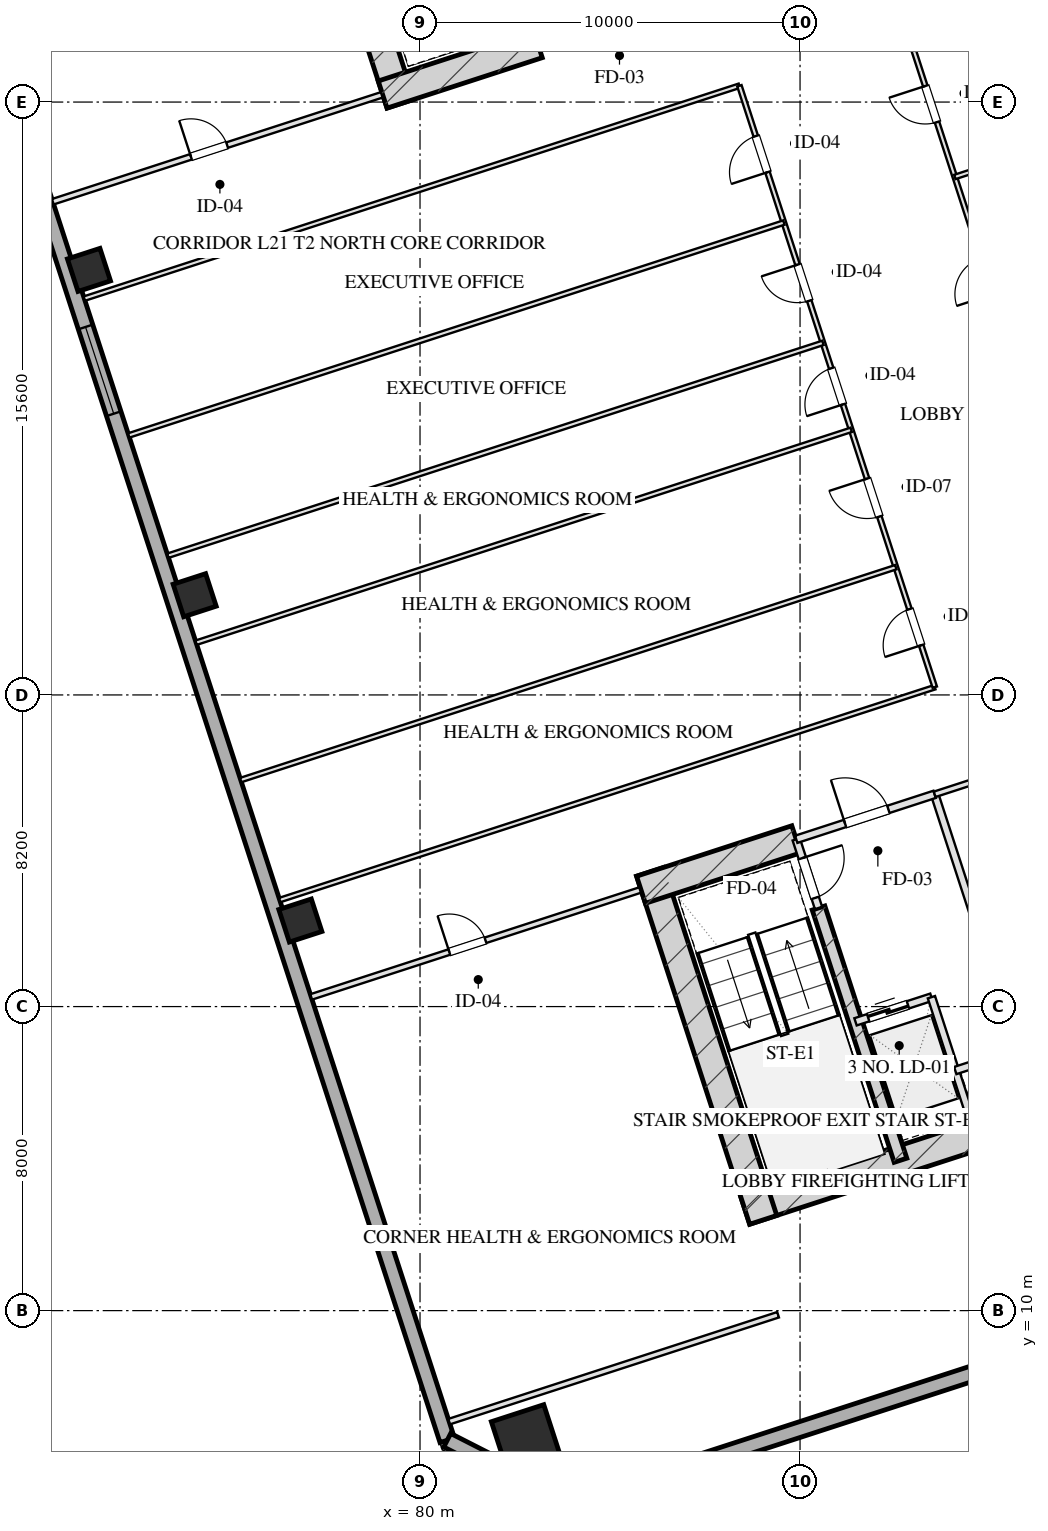
"""IFC4 building model, lengths in metres.
Left out: names, types, materials, properties, quantities, classifications, styles, units other than length and angle.
Written with IfcOpenShell. Run it as: python <this file> out.ifc"""

import sys

from ifc_helpers import new_model, si_unit, direction, frame, frame_2d, origin, origin_2d, place, context, subcontext, project, spatial, rectangle, hollow_rectangle, extrude, element, fill, save


model = new_model("IFC4")
c1 = context("Model", 3, precision=1e-05, world=origin(), true_north=direction((0.0, 1.0)))
c2 = subcontext(c1, "Body", "Model", "MODEL_VIEW")
j1 = project(units=[si_unit("LENGTHUNIT", "METRE"), si_unit("PLANEANGLEUNIT", "RADIAN")], contexts=[c1])
p1 = place(None, origin())
s1 = spatial("IfcSite", under=j1, at=p1, CompositionType="ELEMENT")
p2 = place(p1, origin())
s2 = spatial("IfcBuilding", under=s1, at=p2, CompositionType="ELEMENT")
p3 = place(p2, frame((0.0, 0.0, 85.1)))
s3 = spatial("IfcBuildingStorey", under=s2, at=p3, CompositionType="ELEMENT", Elevation=85.1)
p4 = place(p3, frame((88.559, 12.629, 0.0), z_axis=(0.0, 0.0, 1.0), x_axis=(0.951056072937, 0.309018358888, 0.0)))
e1 = element("IfcWall", 1, at=p4, inside=s3, PredefinedType="SHEAR", context=c2, shape_type="SweptSolid", body=[
    extrude(rectangle(XDim=16.55, YDim=0.75, at=frame_2d((8.275, 0.0))), origin(), (0.0, 0.0, 1.0), 3.45),
])
p5 = place(p3, frame((86.055, 21.546, 0.0), z_axis=(0.0, 0.0, 1.0), x_axis=(0.309023585745, -0.951054374604, 0.0)))
e2 = element("IfcWall", 2, at=p5, inside=s3, PredefinedType="SHEAR", context=c2, shape_type="SweptSolid", body=[
    extrude(rectangle(XDim=9.63, YDim=0.75, at=frame_2d((4.815, 0.0))), origin(), (0.0, 0.0, 1.0), 3.45),
])
p6 = place(p3, frame((90.486, 20.594, 0.0), z_axis=(0.0, 0.0, 1.0), x_axis=(0.309020428229, -0.951055400562, 0.0)))
e3 = element("IfcWall", 3, at=p6, inside=s3, PredefinedType="SHEAR", context=c2, shape_type="SweptSolid", body=[
    extrude(rectangle(XDim=6.98, YDim=0.35, at=frame_2d((3.49, 0.0))), origin(), (0.0, 0.0, 1.0), 3.45),
])
p7 = place(p3, frame((85.814, 21.074, 0.0), z_axis=(0.0, 0.0, 1.0), x_axis=(0.95106580992, 0.308988390074, 0.0)))
e4 = element("IfcWall", 4, at=p7, inside=s3, PredefinedType="SHEAR", context=c2, shape_type="SweptSolid", body=[
    extrude(rectangle(XDim=4.295, YDim=0.75, at=frame_2d((2.147, 0.0))), origin(), (0.0, 0.0, 1.0), 3.45),
])
p8 = place(p3, frame((79.489, 41.756, 0.0), z_axis=(0.0, 0.0, 1.0), x_axis=(-0.309016134813, 0.951056795583, 0.0)))
e5 = element("IfcWall", 5, at=p8, inside=s3, PredefinedType="SHEAR", context=c2, shape_type="SweptSolid", body=[
    extrude(rectangle(XDim=9.63, YDim=0.75, at=frame_2d((4.815, 0.0))), origin(), (0.0, 0.0, 1.0), 3.45),
])
p9 = place(p3, frame((79.016, 41.997, 0.0), z_axis=(0.0, 0.0, 1.0), x_axis=(0.95106038264, 0.309005094736, 0.0)))
e6 = element("IfcWall", 6, at=p9, inside=s3, PredefinedType="SHEAR", context=c2, shape_type="SweptSolid", body=[
    extrude(rectangle(XDim=4.295, YDim=0.75, at=frame_2d((2.147, 0.0))), origin(), (0.0, 0.0, 1.0), 3.45),
])
p10 = place(p3, frame((82.791, 6.612, 0.0), z_axis=(0.0, 0.0, 1.0), x_axis=(0.951056516295, 0.309016994375, 0.0)))
e7 = element("IfcColumn", 7, at=p10, inside=s3, PredefinedType="COLUMN", context=c2, shape_type="SweptSolid", body=[
    extrude(hollow_rectangle(XDim=1.45, YDim=1.45, WallThickness=0.05, at=origin_2d()), origin(), (0.0, 0.0, 1.0), 3.451),
])
for number, where, z_axis, x_axis in (
    (8, (76.851, 20.264, 0.0), (0.0, 0.0, 1.0), (0.951, 0.309, 0.0)),
    (9, (74.07, 28.824, 0.0), (0.0, 0.0, 1.0), (0.951, 0.309, 0.0)),
    (10, (71.289, 37.384, 0.0), (0.0, 0.0, 1.0), (0.951, 0.309, 0.0)),
):
    element("IfcColumn", number, at=place(p3, frame(where, z_axis=z_axis, x_axis=x_axis)), inside=s3, PredefinedType="COLUMN", context=c2, shape_type="SweptSolid", body=[
        extrude(hollow_rectangle(XDim=0.9, YDim=0.9, WallThickness=0.032, at=origin_2d()), origin(), (0.0, 0.0, 1.0), 3.451),
    ])
p11 = place(p3, frame((80.716, 6.59, 0.0), z_axis=(0.0, 0.0, 1.0), x_axis=(-0.309017542002, 0.95105633836, 0.0)))
e11 = element("IfcWall", 11, at=p11, inside=s3, PredefinedType="SOLIDWALL", context=c2, shape_type="SweptSolid", body=[
    extrude(rectangle(XDim=46.4, YDim=0.4, at=frame_2d((23.2, 0.0))), origin(), (0.0, 0.0, 1.0), 2.61),
])
p12 = place(p11, frame((28.4, 0.0, 0.75)))
e12 = element("IfcOpeningElement", 12, at=p12, cuts=e11, PredefinedType="OPENING", context=c2, shape_type="SweptSolid", body=[
    extrude(rectangle(XDim=2.4, YDim=1.46, at=frame_2d((1.2, 0.73))), frame((0.0, 0.21, 0.0), z_axis=(0.0, -1.0, 0.0), x_axis=(1.0, 0.0, 0.0)), (0.0, 0.0, 1.0), 0.42),
])
p13 = place(p3, frame((111.953, 14.005, 0.0), z_axis=(0.0, 0.0, 1.0), x_axis=(-0.95105505922, -0.309021478754, 0.0)))
e13 = element("IfcWall", 13, at=p13, inside=s3, PredefinedType="SOLIDWALL", context=c2, shape_type="SweptSolid", body=[
    extrude(rectangle(XDim=29.4, YDim=0.4, at=frame_2d((14.7, 0.0))), origin(), (0.0, 0.0, 1.0), 2.61),
])
p14 = place(p3, frame((83.992, 4.92, 0.0), z_axis=(0.0, 0.0, 1.0), x_axis=(-0.891001999643, 0.45399937955, 0.0)))
e14 = element("IfcWall", 14, at=p14, inside=s3, PredefinedType="SOLIDWALL", context=c2, shape_type="SweptSolid", body=[
    extrude(rectangle(XDim=3.677, YDim=0.4, at=frame_2d((1.839, 0.0))), origin(), (0.0, 0.0, 1.0), 2.61),
])
p15 = place(p3, frame((89.899, 22.401, 0.0), z_axis=(0.0, 0.0, 1.0), x_axis=(0.308932062672, -0.951084108086, 0.0)))
e15 = element("IfcWall", 15, at=p15, inside=s3, PredefinedType="PARTITIONING", context=c2, shape_type="SweptSolid", body=[
    extrude(rectangle(XDim=1.9, YDim=0.2, at=frame_2d((0.95, 0.0))), origin(), (0.0, 0.0, 1.0), 3.175),
])
p16 = place(p15, frame((0.52, 0.0, 0.0)))
e16 = element("IfcOpeningElement", 16, at=p16, cuts=e15, PredefinedType="OPENING", context=c2, shape_type="SweptSolid", body=[
    extrude(rectangle(XDim=1.1, YDim=2.05, at=frame_2d((0.55, 1.025))), frame((0.0, 0.11, 0.0), z_axis=(0.0, -1.0, 0.0), x_axis=(1.0, 0.0, 0.0)), (0.0, 0.0, 1.0), 0.22),
])
p17 = place(p3, frame((93.542, 23.585, 0.0), z_axis=(0.0, 0.0, 1.0), x_axis=(0.309042196757, -0.951048327176, 0.0)))
e17 = element("IfcWall", 17, at=p17, inside=s3, PredefinedType="PARTITIONING", context=c2, shape_type="SweptSolid", body=[
    extrude(rectangle(XDim=8.43, YDim=0.2, at=frame_2d((4.215, 0.0))), origin(), (0.0, 0.0, 1.0), 3.175),
])
p18 = place(p3, frame((89.899, 22.401, 0.0), z_axis=(0.0, 0.0, 1.0), x_axis=(0.951046716504, 0.309047153403, 0.0)))
e18 = element("IfcWall", 18, at=p18, inside=s3, PredefinedType="PARTITIONING", context=c2, shape_type="SweptSolid", body=[
    extrude(rectangle(XDim=3.83, YDim=0.2, at=frame_2d((1.915, 0.0))), origin(), (0.0, 0.0, 1.0), 3.175),
])
p19 = place(p18, frame((1.35, 0.0, 0.0)))
e19 = element("IfcOpeningElement", 19, at=p19, cuts=e18, PredefinedType="OPENING", context=c2, shape_type="SweptSolid", body=[
    extrude(rectangle(XDim=1.2, YDim=2.05, at=frame_2d((0.6, 1.025))), frame((0.0, 0.11, 0.0), z_axis=(0.0, -1.0, 0.0), x_axis=(1.0, 0.0, 0.0)), (0.0, 0.0, 1.0), 0.22),
])
p20 = place(p3, frame((91.46, 17.598, 0.0), z_axis=(0.0, 0.0, 1.0), x_axis=(0.951062257173, 0.308999325213, 0.0)))
e20 = element("IfcWall", 20, at=p20, inside=s3, PredefinedType="PARTITIONING", context=c2, shape_type="SweptSolid", body=[
    extrude(rectangle(XDim=2.1, YDim=0.2, at=frame_2d((1.05, 0.0))), origin(), (0.0, 0.0, 1.0), 3.175),
])
p21 = place(p20, frame((0.35, 0.0, 0.0)))
e21 = element("IfcOpeningElement", 21, at=p21, cuts=e20, PredefinedType="OPENING", context=c2, shape_type="SweptSolid", body=[
    extrude(rectangle(XDim=1.1, YDim=2.05, at=frame_2d((0.55, 1.025))), frame((0.0, 0.11, 0.0), z_axis=(0.0, -1.0, 0.0), x_axis=(1.0, 0.0, 0.0)), (0.0, 0.0, 1.0), 0.22),
])
p22 = place(p3, frame((93.457, 18.247, 0.0), z_axis=(0.0, 0.0, 1.0), x_axis=(0.3089935693, -0.951064127245, 0.0)))
e22 = element("IfcWall", 22, at=p22, inside=s3, PredefinedType="PARTITIONING", context=c2, shape_type="SweptSolid", body=[
    extrude(rectangle(XDim=3.7, YDim=0.2, at=frame_2d((1.85, 0.0))), origin(), (0.0, 0.0, 1.0), 3.175),
])
p23 = place(p3, frame((94.084, 16.317, 0.0), z_axis=(0.0, 0.0, 1.0), x_axis=(0.951041328149, 0.309063734775, 0.0)))
e23 = element("IfcWall", 23, at=p23, inside=s3, PredefinedType="PARTITIONING", context=c2, shape_type="SweptSolid", body=[
    extrude(rectangle(XDim=1.73, YDim=0.2, at=frame_2d((0.865, 0.0))), origin(), (0.0, 0.0, 1.0), 3.175),
])
p24 = place(p3, frame((93.542, 23.585, 0.0), z_axis=(0.0, 0.0, 1.0), x_axis=(0.951063829732, 0.308994485023, 0.0)))
e24 = element("IfcWall", 24, at=p24, inside=s3, PredefinedType="PARTITIONING", context=c2, shape_type="SweptSolid", body=[
    extrude(rectangle(XDim=4.4, YDim=0.15, at=frame_2d((2.2, 0.0))), origin(), (0.0, 0.0, 1.0), 3.175),
])
p25 = place(p24, frame((1.45, 0.0, 0.0)))
e25 = element("IfcOpeningElement", 25, at=p25, cuts=e24, PredefinedType="OPENING", context=c2, shape_type="SweptSolid", body=[
    extrude(rectangle(XDim=1.5, YDim=2.05, at=frame_2d((0.75, 1.025))), frame((0.0, 0.085, 0.0), z_axis=(0.0, -1.0, 0.0), x_axis=(1.0, 0.0, 0.0)), (0.0, 0.0, 1.0), 0.17),
])
p26 = place(p3, frame((80.767, 7.079, 0.0), z_axis=(0.0, 0.0, 1.0), x_axis=(0.951057133767, 0.309015093986, 0.0)))
e26 = element("IfcWall", 26, at=p26, inside=s3, PredefinedType="PARTITIONING", context=c2, shape_type="SweptSolid", body=[
    extrude(rectangle(XDim=9.1, YDim=0.15, at=frame_2d((4.55, 0.0))), origin(), (0.0, 0.0, 1.0), 3.175),
])
p27 = place(p3, frame((77.136, 18.254, 0.0), z_axis=(0.0, 0.0, 1.0), x_axis=(0.951057133767, 0.309015093986, 0.0)))
e27 = element("IfcWall", 27, at=p27, inside=s3, PredefinedType="PARTITIONING", context=c2, shape_type="SweptSolid", body=[
    extrude(rectangle(XDim=9.1, YDim=0.15, at=frame_2d((4.55, 0.0))), origin(), (0.0, 0.0, 1.0), 3.175),
])
p28 = place(p27, frame((3.822, 0.0, 0.0)))
e28 = element("IfcOpeningElement", 28, at=p28, cuts=e27, PredefinedType="OPENING", context=c2, shape_type="SweptSolid", body=[
    extrude(rectangle(XDim=1.0, YDim=2.05, at=frame_2d((0.5, 1.025))), frame((0.0, 0.085, 0.0), z_axis=(0.0, -1.0, 0.0), x_axis=(1.0, 0.0, 0.0)), (0.0, 0.0, 1.0), 0.17),
])
p29 = place(p3, frame((70.338, 39.177, 0.0), z_axis=(0.0, 0.0, 1.0), x_axis=(0.951059695568, 0.309007209409, 0.0)))
e29 = element("IfcWall", 29, at=p29, inside=s3, PredefinedType="PARTITIONING", context=c2, shape_type="SweptSolid", body=[
    extrude(rectangle(XDim=9.1, YDim=0.15, at=frame_2d((4.55, 0.0))), origin(), (0.0, 0.0, 1.0), 3.175),
])
p30 = place(p29, frame((3.822, 0.0, 0.0)))
e30 = element("IfcOpeningElement", 30, at=p30, cuts=e29, PredefinedType="OPENING", context=c2, shape_type="SweptSolid", body=[
    extrude(rectangle(XDim=1.0, YDim=2.05, at=frame_2d((0.5, 1.025))), frame((0.0, 0.085, 0.0), z_axis=(0.0, -1.0, 0.0), x_axis=(1.0, 0.0, 0.0)), (0.0, 0.0, 1.0), 0.17),
])
p31 = place(p3, frame((76.308, 20.803, 0.0), z_axis=(0.0, 0.0, 1.0), x_axis=(0.951054952586, 0.309021806935, 0.0)))
e31 = element("IfcWall", 31, at=p31, inside=s3, PredefinedType="PARTITIONING", context=c2, shape_type="SweptSolid", body=[
    extrude(rectangle(XDim=18.125, YDim=0.12, at=frame_2d((9.062, 0.0))), origin(), (0.0, 0.0, 1.0), 3.175),
])
p32 = place(p3, frame((71.166, 36.629, 0.0), z_axis=(0.0, 0.0, 1.0), x_axis=(0.951057625014, 0.309013582067, 0.0)))
e32 = element("IfcWall", 32, at=p32, inside=s3, PredefinedType="PARTITIONING", context=c2, shape_type="SweptSolid", body=[
    extrude(rectangle(XDim=18.125, YDim=0.12, at=frame_2d((9.062, 0.0))), origin(), (0.0, 0.0, 1.0), 3.175),
])
p33 = place(p3, frame((93.546, 26.404, 0.0), z_axis=(0.0, 0.0, 1.0), x_axis=(-0.309022042254, 0.951054876125, 0.0)))
e33 = element("IfcWall", 33, at=p33, inside=s3, PredefinedType="PARTITIONING", context=c2, shape_type="SweptSolid", body=[
    extrude(rectangle(XDim=16.64, YDim=0.12, at=frame_2d((8.32, 0.0))), origin(), (0.0, 0.0, 1.0), 3.175),
])
p34 = place(p33, frame((1.16, 0.0, 0.0)))
e34 = element("IfcOpeningElement", 34, at=p34, cuts=e33, PredefinedType="OPENING", context=c2, shape_type="SweptSolid", body=[
    extrude(rectangle(XDim=1.0, YDim=2.05, at=frame_2d((0.5, 1.025))), frame((0.0, 0.07, 0.0), z_axis=(0.0, -1.0, 0.0), x_axis=(1.0, 0.0, 0.0)), (0.0, 0.0, 1.0), 0.14),
])
p35 = place(p33, frame((4.72, 0.0, 0.0)))
e35 = element("IfcOpeningElement", 35, at=p35, cuts=e33, PredefinedType="OPENING", context=c2, shape_type="SweptSolid", body=[
    extrude(rectangle(XDim=1.05, YDim=2.05, at=frame_2d((0.525, 1.025))), frame((0.0, 0.07, 0.0), z_axis=(0.0, -1.0, 0.0), x_axis=(1.0, 0.0, 0.0)), (0.0, 0.0, 1.0), 0.14),
])
p36 = place(p33, frame((7.823, 0.0, 0.0)))
e36 = element("IfcOpeningElement", 36, at=p36, cuts=e33, PredefinedType="OPENING", context=c2, shape_type="SweptSolid", body=[
    extrude(rectangle(XDim=1.0, YDim=2.05, at=frame_2d((0.5, 1.025))), frame((0.0, 0.07, 0.0), z_axis=(0.0, -1.0, 0.0), x_axis=(1.0, 0.0, 0.0)), (0.0, 0.0, 1.0), 0.14),
])
p37 = place(p33, frame((10.69, 0.0, 0.0)))
e37 = element("IfcOpeningElement", 37, at=p37, cuts=e33, PredefinedType="OPENING", context=c2, shape_type="SweptSolid", body=[
    extrude(rectangle(XDim=1.0, YDim=2.05, at=frame_2d((0.5, 1.025))), frame((0.0, 0.07, 0.0), z_axis=(0.0, -1.0, 0.0), x_axis=(1.0, 0.0, 0.0)), (0.0, 0.0, 1.0), 0.14),
])
p38 = place(p33, frame((14.247, 0.0, 0.0)))
e38 = element("IfcOpeningElement", 38, at=p38, cuts=e33, PredefinedType="OPENING", context=c2, shape_type="SweptSolid", body=[
    extrude(rectangle(XDim=1.0, YDim=2.05, at=frame_2d((0.5, 1.025))), frame((0.0, 0.07, 0.0), z_axis=(0.0, -1.0, 0.0), x_axis=(1.0, 0.0, 0.0)), (0.0, 0.0, 1.0), 0.14),
])
p39 = place(p3, frame((97.968, 27.841, 0.0), z_axis=(0.0, 0.0, 1.0), x_axis=(-0.30901773025, 0.951056277195, 0.0)))
e39 = element("IfcWall", 39, at=p39, inside=s3, PredefinedType="PARTITIONING", context=c2, shape_type="SweptSolid", body=[
    extrude(rectangle(XDim=16.64, YDim=0.12, at=frame_2d((8.32, 0.0))), origin(), (0.0, 0.0, 1.0), 3.175),
])
p40 = place(p39, frame((3.06, 0.0, 0.0)))
e40 = element("IfcOpeningElement", 40, at=p40, cuts=e39, PredefinedType="OPENING", context=c2, shape_type="SweptSolid", body=[
    extrude(rectangle(XDim=1.0, YDim=2.05, at=frame_2d((0.5, 1.025))), frame((0.0, 0.07, 0.0), z_axis=(0.0, -1.0, 0.0), x_axis=(1.0, 0.0, 0.0)), (0.0, 0.0, 1.0), 0.14),
])
p41 = place(p39, frame((9.363, 0.0, 0.0)))
e41 = element("IfcOpeningElement", 41, at=p41, cuts=e39, PredefinedType="OPENING", context=c2, shape_type="SweptSolid", body=[
    extrude(rectangle(XDim=1.0, YDim=2.05, at=frame_2d((0.5, 1.025))), frame((0.0, 0.07, 0.0), z_axis=(0.0, -1.0, 0.0), x_axis=(1.0, 0.0, 0.0)), (0.0, 0.0, 1.0), 0.14),
])
p42 = place(p39, frame((14.123, 0.0, 0.0)))
e42 = element("IfcOpeningElement", 42, at=p42, cuts=e39, PredefinedType="OPENING", context=c2, shape_type="SweptSolid", body=[
    extrude(rectangle(XDim=1.0, YDim=2.05, at=frame_2d((0.5, 1.025))), frame((0.0, 0.07, 0.0), z_axis=(0.0, -1.0, 0.0), x_axis=(1.0, 0.0, 0.0)), (0.0, 0.0, 1.0), 0.14),
])
for number, where, z_axis, x_axis in (
    (43, (75.282, 23.96, 0.0), (0.0, 0.0, 1.0), (0.951, 0.309, 0.0)),
    (44, (74.108, 27.574, 0.0), (0.0, 0.0, 1.0), (0.951, 0.309, 0.0)),
):
    element("IfcWall", number, at=place(p3, frame(where, z_axis=z_axis, x_axis=x_axis)), inside=s3, PredefinedType="PARTITIONING", context=c2, shape_type="SweptSolid", body=[
        extrude(rectangle(XDim=18.125, YDim=0.12, at=frame_2d((9.062, 0.0))), origin(), (0.0, 0.0, 1.0), 3.175),
    ])
p43 = place(p3, frame((73.364, 29.863, 0.0), z_axis=(0.0, 0.0, 1.0), x_axis=(0.951057625014, 0.309013582067, 0.0)))
e45 = element("IfcWall", 45, at=p43, inside=s3, PredefinedType="PARTITIONING", context=c2, shape_type="SweptSolid", body=[
    extrude(rectangle(XDim=18.125, YDim=0.12, at=frame_2d((9.062, 0.0))), origin(), (0.0, 0.0, 1.0), 3.175),
])
p44 = place(p3, frame((72.336, 33.028, 0.0), z_axis=(0.0, 0.0, 1.0), x_axis=(0.951058911225, 0.309009623443, 0.0)))
e46 = element("IfcWall", 46, at=p44, inside=s3, PredefinedType="PARTITIONING", context=c2, shape_type="SweptSolid", body=[
    extrude(rectangle(XDim=18.125, YDim=0.12, at=frame_2d((9.062, 0.0))), origin(), (0.0, 0.0, 1.0), 3.175),
])
p45 = place(p3, frame((94.073, 39.829, 0.0), z_axis=(0.0, 0.0, 1.0), x_axis=(0.951057778088, 0.309013110947, 0.0)))
e47 = element("IfcWall", 47, at=p45, inside=s3, PredefinedType="PARTITIONING", context=c2, shape_type="SweptSolid", body=[
    extrude(rectangle(XDim=11.425, YDim=0.12, at=frame_2d((5.712, 0.0))), origin(), (0.0, 0.0, 1.0), 3.175),
])
p46 = place(p12, origin())
e48 = element("IfcWindow", 48, at=p46, inside=s3, PartitioningType="TRIPLE_PANEL_VERTICAL", PredefinedType="WINDOW", context=c2, shape_type="SweptSolid", body=[
    extrude(rectangle(XDim=2.4, YDim=1.46, at=frame_2d((1.2, 0.73))), frame((0.0, 0.03, 0.0), z_axis=(0.0, -1.0, 0.0), x_axis=(1.0, 0.0, 0.0)), (0.0, 0.0, 1.0), 0.06),
])
fill(e12, e48)
p47 = place(p16, origin())
e49 = element("IfcDoor", 49, at=p47, inside=s3, OperationType="SINGLE_SWING_LEFT", PredefinedType="DOOR", context=c2, shape_type="SweptSolid", body=[
    extrude(rectangle(XDim=1.1, YDim=2.05, at=frame_2d((0.55, 1.025))), frame((0.0, 0.025, 0.0), z_axis=(0.0, -1.0, 0.0), x_axis=(1.0, 0.0, 0.0)), (0.0, 0.0, 1.0), 0.05),
])
fill(e16, e49)
p48 = place(p19, origin())
e50 = element("IfcDoor", 50, at=p48, inside=s3, OperationType="SINGLE_SWING_LEFT", PredefinedType="DOOR", context=c2, shape_type="SweptSolid", body=[
    extrude(rectangle(XDim=1.2, YDim=2.05, at=frame_2d((0.6, 1.025))), frame((0.0, 0.025, 0.0), z_axis=(0.0, -1.0, 0.0), x_axis=(1.0, 0.0, 0.0)), (0.0, 0.0, 1.0), 0.05),
])
fill(e19, e50)
p49 = place(p21, origin())
e51 = element("IfcDoor", 51, at=p49, inside=s3, OperationType="DOUBLE_DOOR_SLIDING", PredefinedType="DOOR", context=c2, shape_type="SweptSolid", body=[
    extrude(rectangle(XDim=1.1, YDim=2.05, at=frame_2d((0.55, 1.025))), frame((0.0, 0.025, 0.0), z_axis=(0.0, -1.0, 0.0), x_axis=(1.0, 0.0, 0.0)), (0.0, 0.0, 1.0), 0.05),
])
fill(e21, e51)
p50 = place(p28, origin())
e52 = element("IfcDoor", 52, at=p50, inside=s3, OperationType="SINGLE_SWING_LEFT", PredefinedType="DOOR", context=c2, shape_type="SweptSolid", body=[
    extrude(rectangle(XDim=1.0, YDim=2.05, at=frame_2d((0.5, 1.025))), frame((0.0, 0.025, 0.0), z_axis=(0.0, -1.0, 0.0), x_axis=(1.0, 0.0, 0.0)), (0.0, 0.0, 1.0), 0.05),
])
fill(e28, e52)
p51 = place(p30, origin())
e53 = element("IfcDoor", 53, at=p51, inside=s3, OperationType="SINGLE_SWING_LEFT", PredefinedType="DOOR", context=c2, shape_type="SweptSolid", body=[
    extrude(rectangle(XDim=1.0, YDim=2.05, at=frame_2d((0.5, 1.025))), frame((0.0, 0.025, 0.0), z_axis=(0.0, -1.0, 0.0), x_axis=(1.0, 0.0, 0.0)), (0.0, 0.0, 1.0), 0.05),
])
fill(e30, e53)
p52 = place(p34, origin())
e54 = element("IfcDoor", 54, at=p52, inside=s3, OperationType="SINGLE_SWING_LEFT", PredefinedType="DOOR", context=c2, shape_type="SweptSolid", body=[
    extrude(rectangle(XDim=1.0, YDim=2.05, at=frame_2d((0.5, 1.025))), frame((0.0, 0.025, 0.0), z_axis=(0.0, -1.0, 0.0), x_axis=(1.0, 0.0, 0.0)), (0.0, 0.0, 1.0), 0.05),
])
fill(e34, e54)
p53 = place(p35, origin())
e55 = element("IfcDoor", 55, at=p53, inside=s3, OperationType="SINGLE_SWING_RIGHT", PredefinedType="DOOR", context=c2, shape_type="SweptSolid", body=[
    extrude(rectangle(XDim=1.05, YDim=2.05, at=frame_2d((0.525, 1.025))), frame((0.0, 0.025, 0.0), z_axis=(0.0, -1.0, 0.0), x_axis=(1.0, 0.0, 0.0)), (0.0, 0.0, 1.0), 0.05),
])
fill(e35, e55)
p54 = place(p36, origin())
e56 = element("IfcDoor", 56, at=p54, inside=s3, OperationType="SINGLE_SWING_LEFT", PredefinedType="DOOR", context=c2, shape_type="SweptSolid", body=[
    extrude(rectangle(XDim=1.0, YDim=2.05, at=frame_2d((0.5, 1.025))), frame((0.0, 0.025, 0.0), z_axis=(0.0, -1.0, 0.0), x_axis=(1.0, 0.0, 0.0)), (0.0, 0.0, 1.0), 0.05),
])
fill(e36, e56)
p55 = place(p37, origin())
e57 = element("IfcDoor", 57, at=p55, inside=s3, OperationType="SINGLE_SWING_RIGHT", PredefinedType="DOOR", context=c2, shape_type="SweptSolid", body=[
    extrude(rectangle(XDim=1.0, YDim=2.05, at=frame_2d((0.5, 1.025))), frame((0.0, 0.025, 0.0), z_axis=(0.0, -1.0, 0.0), x_axis=(1.0, 0.0, 0.0)), (0.0, 0.0, 1.0), 0.05),
])
fill(e37, e57)
p56 = place(p38, origin())
e58 = element("IfcDoor", 58, at=p56, inside=s3, OperationType="SINGLE_SWING_LEFT", PredefinedType="DOOR", context=c2, shape_type="SweptSolid", body=[
    extrude(rectangle(XDim=1.0, YDim=2.05, at=frame_2d((0.5, 1.025))), frame((0.0, 0.025, 0.0), z_axis=(0.0, -1.0, 0.0), x_axis=(1.0, 0.0, 0.0)), (0.0, 0.0, 1.0), 0.05),
])
fill(e38, e58)
p57 = place(p42, origin())
e59 = element("IfcDoor", 59, at=p57, inside=s3, OperationType="SINGLE_SWING_RIGHT", PredefinedType="DOOR", context=c2, shape_type="SweptSolid", body=[
    extrude(rectangle(XDim=1.0, YDim=2.05, at=frame_2d((0.5, 1.025))), frame((0.0, 0.025, 0.0), z_axis=(0.0, -1.0, 0.0), x_axis=(1.0, 0.0, 0.0)), (0.0, 0.0, 1.0), 0.05),
])
fill(e42, e59)
save(model, sys.argv[1])
